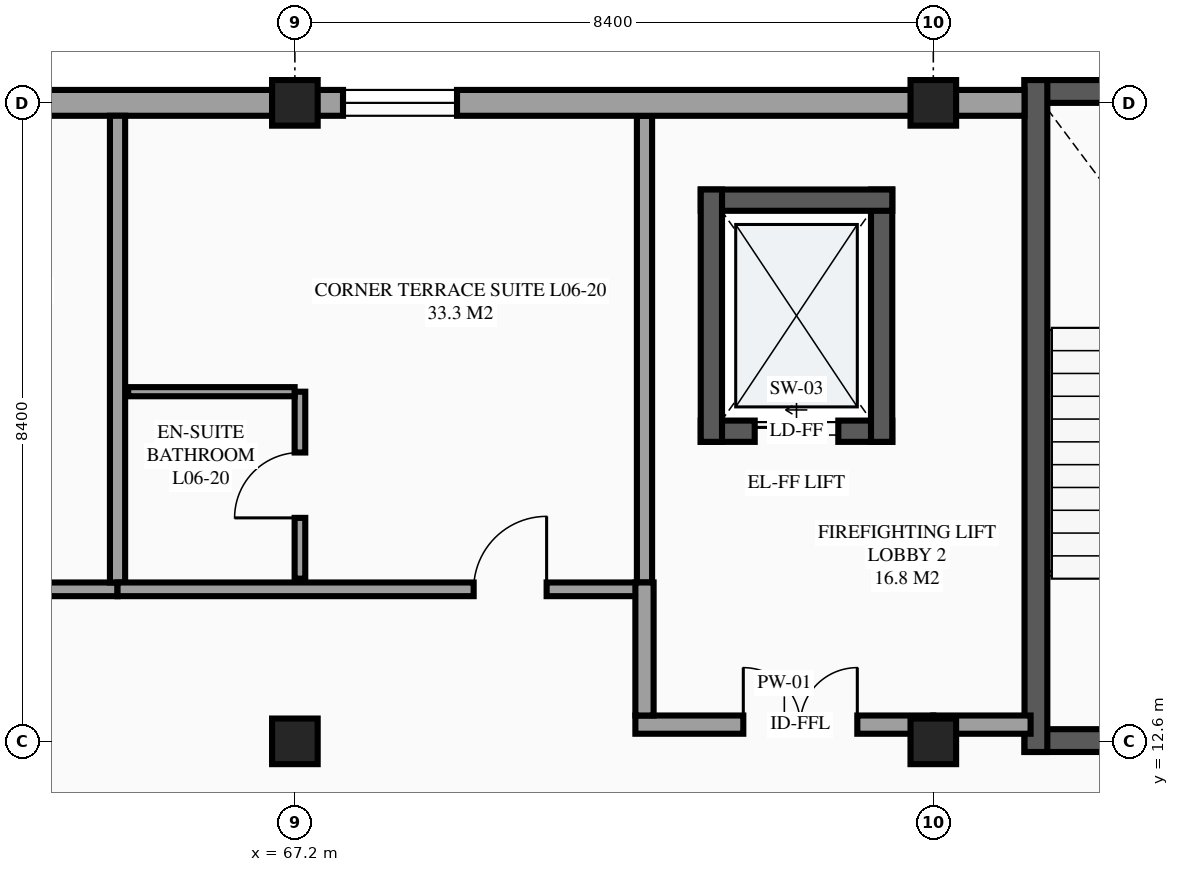
"""IFC4 building model, lengths in metres.
Left out: names, types, materials, properties, quantities, classifications, styles, units other than length and angle.
Written with IfcOpenShell. Run it as: python <this file> out.ifc"""

import sys

from ifc_helpers import new_model, si_unit, direction, frame, frame_2d, origin, origin_2d, place, context, subcontext, project, spatial, rectangle, extrude, element, fill, save


model = new_model("IFC4")
c1 = context("Model", 3, precision=1e-05, world=origin(), true_north=direction((0.0, 1.0)))
c2 = subcontext(c1, "Body", "Model", "MODEL_VIEW")
j1 = project(units=[si_unit("LENGTHUNIT", "METRE"), si_unit("PLANEANGLEUNIT", "RADIAN")], contexts=[c1])
p1 = place(None, origin())
s1 = spatial("IfcSite", under=j1, at=p1, CompositionType="ELEMENT")
p2 = place(p1, origin())
s2 = spatial("IfcBuilding", under=s1, at=p2, CompositionType="ELEMENT")
p3 = place(p2, frame((0.0, 0.0, 25.5)))
s3 = spatial("IfcBuildingStorey", under=s2, at=p3, CompositionType="ELEMENT", Elevation=25.5)
for number, where, z_axis, x_axis in (
    (1, (67.2, 12.6, 0.0), (0.0, 0.0, 1.0), (1.0, 0.0, 0.0)),
    (2, (67.2, 21.0, 0.0), (0.0, 0.0, 1.0), (1.0, 0.0, 0.0)),
    (3, (75.6, 12.6, 0.0), (0.0, 0.0, 1.0), (1.0, 0.0, 0.0)),
    (4, (75.6, 21.0, 0.0), (0.0, 0.0, 1.0), (1.0, 0.0, 0.0)),
):
    element("IfcColumn", number, at=place(p3, frame(where, z_axis=z_axis, x_axis=x_axis)), inside=s3, PredefinedType="COLUMN", context=c2, shape_type="SweptSolid", body=[
        extrude(rectangle(XDim=0.6, YDim=0.6, at=origin_2d()), origin(), (0.0, 0.0, 1.0), 3.6),
    ])
p4 = place(p3, frame((67.2, 21.0, 0.0), z_axis=(0.0, 0.0, 1.0), x_axis=(-1.0, 0.0, 0.0)))
e5 = element("IfcWall", 5, at=p4, inside=s3, PredefinedType="STANDARD", context=c2, shape_type="SweptSolid", body=[
    extrude(rectangle(XDim=16.8, YDim=0.34, at=frame_2d((8.4, 0.0))), origin(), (0.0, 0.0, 1.0), 2.43),
])
p5 = place(p4, frame((11.983, 0.0, 0.85)))
e6 = element("IfcOpeningElement", 6, at=p5, cuts=e5, PredefinedType="OPENING", context=c2, shape_type="SweptSolid", body=[
    extrude(rectangle(XDim=1.5, YDim=1.5, at=frame_2d((0.75, 0.75))), frame((0.0, 0.18, 0.0), z_axis=(0.0, -1.0, 0.0), x_axis=(1.0, 0.0, 0.0)), (0.0, 0.0, 1.0), 0.36),
])
p6 = place(p4, frame((5.05, 0.0, 0.85)))
e7 = element("IfcOpeningElement", 7, at=p6, cuts=e5, PredefinedType="OPENING", context=c2, shape_type="SweptSolid", body=[
    extrude(rectangle(XDim=1.5, YDim=1.5, at=frame_2d((0.75, 0.75))), frame((0.0, 0.18, 0.0), z_axis=(0.0, -1.0, 0.0), x_axis=(1.0, 0.0, 0.0)), (0.0, 0.0, 1.0), 0.36),
])
p7 = place(p3, frame((72.54, 16.68, 0.0), z_axis=(0.0, 0.0, 1.0), x_axis=(1.0, 0.0, 0.0)))
e8 = element("IfcWall", 8, at=p7, inside=s3, PredefinedType="SHEAR", context=c2, shape_type="SweptSolid", body=[
    extrude(rectangle(XDim=2.52, YDim=0.28, at=frame_2d((1.26, 0.0))), origin(), (0.0, 0.0, 1.0), 3.6),
])
p8 = place(p7, frame((0.71, 0.0, 0.0)))
e9 = element("IfcOpeningElement", 9, at=p8, cuts=e8, PredefinedType="OPENING", context=c2, shape_type="SweptSolid", body=[
    extrude(rectangle(XDim=1.1, YDim=2.2, at=frame_2d((0.55, 1.1))), frame((0.0, 0.15, 0.0), z_axis=(0.0, -1.0, 0.0), x_axis=(1.0, 0.0, 0.0)), (0.0, 0.0, 1.0), 0.3),
])
p9 = place(p3, frame((74.92, 16.54, 0.0), z_axis=(0.0, 0.0, 1.0), x_axis=(0.0, 1.0, 0.0)))
e10 = element("IfcWall", 10, at=p9, inside=s3, PredefinedType="SHEAR", context=c2, shape_type="SweptSolid", body=[
    extrude(rectangle(XDim=3.32, YDim=0.28, at=frame_2d((1.66, 0.0))), origin(), (0.0, 0.0, 1.0), 3.6),
])
p10 = place(p3, frame((75.06, 19.72, 0.0), z_axis=(0.0, 0.0, 1.0), x_axis=(-1.0, 0.0, 0.0)))
e11 = element("IfcWall", 11, at=p10, inside=s3, PredefinedType="SHEAR", context=c2, shape_type="SweptSolid", body=[
    extrude(rectangle(XDim=2.52, YDim=0.28, at=frame_2d((1.26, 0.0))), origin(), (0.0, 0.0, 1.0), 3.6),
])
p11 = place(p3, frame((72.68, 19.86, 0.0), z_axis=(0.0, 0.0, 1.0), x_axis=(0.0, -1.0, 0.0)))
e12 = element("IfcWall", 12, at=p11, inside=s3, PredefinedType="SHEAR", context=c2, shape_type="SweptSolid", body=[
    extrude(rectangle(XDim=3.32, YDim=0.28, at=frame_2d((1.66, 0.0))), origin(), (0.0, 0.0, 1.0), 3.6),
])
p12 = place(p3, frame((76.8, 12.61, 0.0), z_axis=(0.0, 0.0, 1.0), x_axis=(1.0, 0.0, 0.0)))
e13 = element("IfcWall", 13, at=p12, inside=s3, PredefinedType="SHEAR", context=c2, shape_type="SweptSolid", body=[
    extrude(rectangle(XDim=5.2, YDim=0.3, at=frame_2d((2.6, 0.0))), origin(), (0.0, 0.0, 1.0), 3.6),
])
p13 = place(p12, frame((2.025, 0.0, 0.0)))
e14 = element("IfcOpeningElement", 14, at=p13, cuts=e13, PredefinedType="OPENING", context=c2, shape_type="SweptSolid", body=[
    extrude(rectangle(XDim=1.15, YDim=2.15, at=frame_2d((0.575, 1.075))), frame((0.0, 0.16, 0.0), z_axis=(0.0, -1.0, 0.0), x_axis=(1.0, 0.0, 0.0)), (0.0, 0.0, 1.0), 0.32),
])
p14 = place(p3, frame((82.0, 21.15, 0.0), z_axis=(0.0, 0.0, 1.0), x_axis=(-1.0, 0.0, 0.0)))
e15 = element("IfcWall", 15, at=p14, inside=s3, PredefinedType="SHEAR", context=c2, shape_type="SweptSolid", body=[
    extrude(rectangle(XDim=5.2, YDim=0.3, at=frame_2d((2.6, 0.0))), origin(), (0.0, 0.0, 1.0), 3.6),
])
p15 = place(p3, frame((76.95, 21.3, 0.0), z_axis=(0.0, 0.0, 1.0), x_axis=(0.0, -1.0, 0.0)))
e16 = element("IfcWall", 16, at=p15, inside=s3, PredefinedType="SHEAR", context=c2, shape_type="SweptSolid", body=[
    extrude(rectangle(XDim=8.84, YDim=0.3, at=frame_2d((4.42, 0.0))), origin(), (0.0, 0.0, 1.0), 3.6),
])
p16 = place(p3, frame((57.933, 14.6, 0.0), z_axis=(0.0, 0.0, 1.0), x_axis=(1.0, 0.0, 0.0)))
e17 = element("IfcWall", 17, at=p16, inside=s3, PredefinedType="PARTITIONING", context=c2, shape_type="SweptSolid", body=[
    extrude(rectangle(XDim=6.933, YDim=0.18, at=frame_2d((3.467, 0.0))), origin(), (0.0, 0.0, 1.0), 3.375),
])
p17 = place(p16, frame((4.686, 0.0, 0.0)))
e18 = element("IfcOpeningElement", 18, at=p17, cuts=e17, PredefinedType="OPENING", context=c2, shape_type="SweptSolid", body=[
    extrude(rectangle(XDim=0.96, YDim=2.15, at=frame_2d((0.48, 1.075))), frame((0.0, 0.1, 0.0), z_axis=(0.0, -1.0, 0.0), x_axis=(1.0, 0.0, 0.0)), (0.0, 0.0, 1.0), 0.2),
])
p18 = place(p3, frame((64.867, 14.69, 0.0), z_axis=(0.0, 0.0, 1.0), x_axis=(0.0, 1.0, 0.0)))
e19 = element("IfcWall", 19, at=p18, inside=s3, PredefinedType="PARTITIONING", context=c2, shape_type="SweptSolid", body=[
    extrude(rectangle(XDim=6.14, YDim=0.2, at=frame_2d((3.07, 0.0))), origin(), (0.0, 0.0, 1.0), 3.375),
])
p19 = place(p3, frame((64.867, 14.6, 0.0), z_axis=(0.0, 0.0, 1.0), x_axis=(1.0, 0.0, 0.0)))
e20 = element("IfcWall", 20, at=p19, inside=s3, PredefinedType="PARTITIONING", context=c2, shape_type="SweptSolid", body=[
    extrude(rectangle(XDim=6.933, YDim=0.18, at=frame_2d((3.467, 0.0))), origin(), (0.0, 0.0, 1.0), 3.375),
])
p20 = place(p19, frame((4.686, 0.0, 0.0)))
e21 = element("IfcOpeningElement", 21, at=p20, cuts=e20, PredefinedType="OPENING", context=c2, shape_type="SweptSolid", body=[
    extrude(rectangle(XDim=0.96, YDim=2.15, at=frame_2d((0.48, 1.075))), frame((0.0, 0.1, 0.0), z_axis=(0.0, -1.0, 0.0), x_axis=(1.0, 0.0, 0.0)), (0.0, 0.0, 1.0), 0.2),
])
p21 = place(p3, frame((71.8, 14.69, 0.0), z_axis=(0.0, 0.0, 1.0), x_axis=(0.0, 1.0, 0.0)))
e22 = element("IfcWall", 22, at=p21, inside=s3, PredefinedType="PARTITIONING", context=c2, shape_type="SweptSolid", body=[
    extrude(rectangle(XDim=6.14, YDim=0.2, at=frame_2d((3.07, 0.0))), origin(), (0.0, 0.0, 1.0), 3.375),
])
p22 = place(p3, frame((67.267, 14.74, 0.0), z_axis=(0.0, 0.0, 1.0), x_axis=(0.0, 1.0, 0.0)))
e23 = element("IfcWall", 23, at=p22, inside=s3, PredefinedType="PARTITIONING", context=c2, shape_type="SweptSolid", body=[
    extrude(rectangle(XDim=2.46, YDim=0.14, at=frame_2d((1.23, 0.0))), origin(), (0.0, 0.0, 1.0), 2.43),
])
p23 = place(p22, frame((0.8, 0.0, 0.0)))
e24 = element("IfcOpeningElement", 24, at=p23, cuts=e23, PredefinedType="OPENING", context=c2, shape_type="SweptSolid", body=[
    extrude(rectangle(XDim=0.86, YDim=2.1, at=frame_2d((0.43, 1.05))), frame((0.0, 0.08, 0.0), z_axis=(0.0, -1.0, 0.0), x_axis=(1.0, 0.0, 0.0)), (0.0, 0.0, 1.0), 0.16),
])
p24 = place(p3, frame((65.007, 17.2, 0.0), z_axis=(0.0, 0.0, 1.0), x_axis=(1.0, 0.0, 0.0)))
e25 = element("IfcWall", 25, at=p24, inside=s3, PredefinedType="PARTITIONING", context=c2, shape_type="SweptSolid", body=[
    extrude(rectangle(XDim=2.19, YDim=0.12, at=frame_2d((1.095, 0.0))), origin(), (0.0, 0.0, 1.0), 3.375),
])
p25 = place(p3, frame((71.68, 12.82, 0.0), z_axis=(0.0, 0.0, 1.0), x_axis=(1.0, 0.0, 0.0)))
e26 = element("IfcWall", 26, at=p25, inside=s3, PredefinedType="PARTITIONING", context=c2, shape_type="SweptSolid", body=[
    extrude(rectangle(XDim=3.92, YDim=0.24, at=frame_2d((1.96, 0.0))), origin(), (0.0, 0.0, 1.0), 2.63),
])
p26 = place(p25, frame((1.42, 0.0, 0.0)))
e27 = element("IfcOpeningElement", 27, at=p26, cuts=e26, PredefinedType="OPENING", context=c2, shape_type="SweptSolid", body=[
    extrude(rectangle(XDim=1.5, YDim=2.15, at=frame_2d((0.75, 1.075))), frame((0.0, 0.13, 0.0), z_axis=(0.0, -1.0, 0.0), x_axis=(1.0, 0.0, 0.0)), (0.0, 0.0, 1.0), 0.26),
])
p27 = place(p3, frame((71.8, 12.94, 0.0), z_axis=(0.0, 0.0, 1.0), x_axis=(0.0, 1.0, 0.0)))
e28 = element("IfcWall", 28, at=p27, inside=s3, PredefinedType="PARTITIONING", context=c2, shape_type="SweptSolid", body=[
    extrude(rectangle(XDim=1.75, YDim=0.24, at=frame_2d((0.875, 0.0))), origin(), (0.0, 0.0, 1.0), 3.375),
])
p28 = place(p3, frame((76.8, 21.0, 0.0), z_axis=(0.0, 0.0, 1.0), x_axis=(-1.0, 0.0, 0.0)))
e29 = element("IfcWall", 29, at=p28, inside=s3, PredefinedType="STANDARD", context=c2, shape_type="SweptSolid", body=[
    extrude(rectangle(XDim=1.2, YDim=0.34, at=frame_2d((0.6, 0.0))), origin(), (0.0, 0.0, 1.0), 2.58),
])
p29 = place(p3, frame((75.6, 21.0, 0.0), z_axis=(0.0, 0.0, 1.0), x_axis=(-1.0, 0.0, 0.0)))
e30 = element("IfcWall", 30, at=p29, inside=s3, PredefinedType="STANDARD", context=c2, shape_type="SweptSolid", body=[
    extrude(rectangle(XDim=8.4, YDim=0.34, at=frame_2d((4.2, 0.0))), origin(), (0.0, 0.0, 1.0), 3.133),
])
p30 = place(p29, frame((6.267, 0.0, 0.85)))
e31 = element("IfcOpeningElement", 31, at=p30, cuts=e30, PredefinedType="OPENING", context=c2, shape_type="SweptSolid", body=[
    extrude(rectangle(XDim=1.5, YDim=1.5, at=frame_2d((0.75, 0.75))), frame((0.0, 0.18, 0.0), z_axis=(0.0, -1.0, 0.0), x_axis=(1.0, 0.0, 0.0)), (0.0, 0.0, 1.0), 0.36),
])
p31 = place(p3, frame((75.6, 12.82, 0.0), z_axis=(0.0, 0.0, 1.0), x_axis=(1.0, 0.0, 0.0)))
e32 = element("IfcWall", 32, at=p31, inside=s3, PredefinedType="PARTITIONING", context=c2, shape_type="SweptSolid", body=[
    extrude(rectangle(XDim=1.28, YDim=0.24, at=frame_2d((0.64, 0.0))), origin(), (0.0, 0.0, 1.0), 2.73),
])
p32 = place(p30, origin())
e33 = element("IfcWindow", 33, at=p32, inside=s3, PartitioningType="SINGLE_PANEL", PredefinedType="WINDOW", context=c2, shape_type="SweptSolid", body=[
    extrude(rectangle(XDim=1.5, YDim=1.5, at=frame_2d((0.75, 0.75))), frame((0.0, 0.03, 0.0), z_axis=(0.0, -1.0, 0.0), x_axis=(1.0, 0.0, 0.0)), (0.0, 0.0, 1.0), 0.06),
])
fill(e31, e33)
p33 = place(p8, origin())
e34 = element("IfcDoor", 34, at=p33, inside=s3, OperationType="SLIDING_TO_LEFT", PredefinedType="DOOR", context=c2, shape_type="SweptSolid", body=[
    extrude(rectangle(XDim=1.1, YDim=2.2, at=frame_2d((0.55, 1.1))), frame((0.0, 0.025, 0.0), z_axis=(0.0, -1.0, 0.0), x_axis=(1.0, 0.0, 0.0)), (0.0, 0.0, 1.0), 0.05),
])
fill(e9, e34)
p34 = place(p20, origin())
e35 = element("IfcDoor", 35, at=p34, inside=s3, OperationType="SINGLE_SWING_RIGHT", PredefinedType="DOOR", context=c2, shape_type="SweptSolid", body=[
    extrude(rectangle(XDim=0.96, YDim=2.15, at=frame_2d((0.48, 1.075))), frame((0.0, 0.025, 0.0), z_axis=(0.0, -1.0, 0.0), x_axis=(1.0, 0.0, 0.0)), (0.0, 0.0, 1.0), 0.05),
])
fill(e21, e35)
p35 = place(p23, origin())
e36 = element("IfcDoor", 36, at=p35, inside=s3, OperationType="SINGLE_SWING_LEFT", PredefinedType="DOOR", context=c2, shape_type="SweptSolid", body=[
    extrude(rectangle(XDim=0.86, YDim=2.1, at=frame_2d((0.43, 1.05))), frame((0.0, 0.025, 0.0), z_axis=(0.0, -1.0, 0.0), x_axis=(1.0, 0.0, 0.0)), (0.0, 0.0, 1.0), 0.05),
])
fill(e24, e36)
p36 = place(p26, origin())
e37 = element("IfcDoor", 37, at=p36, inside=s3, OperationType="DOUBLE_DOOR_SINGLE_SWING", PredefinedType="DOOR", context=c2, shape_type="SweptSolid", body=[
    extrude(rectangle(XDim=1.5, YDim=2.15, at=frame_2d((0.75, 1.075))), frame((0.0, 0.025, 0.0), z_axis=(0.0, -1.0, 0.0), x_axis=(1.0, 0.0, 0.0)), (0.0, 0.0, 1.0), 0.05),
])
fill(e27, e37)
save(model, sys.argv[1])
